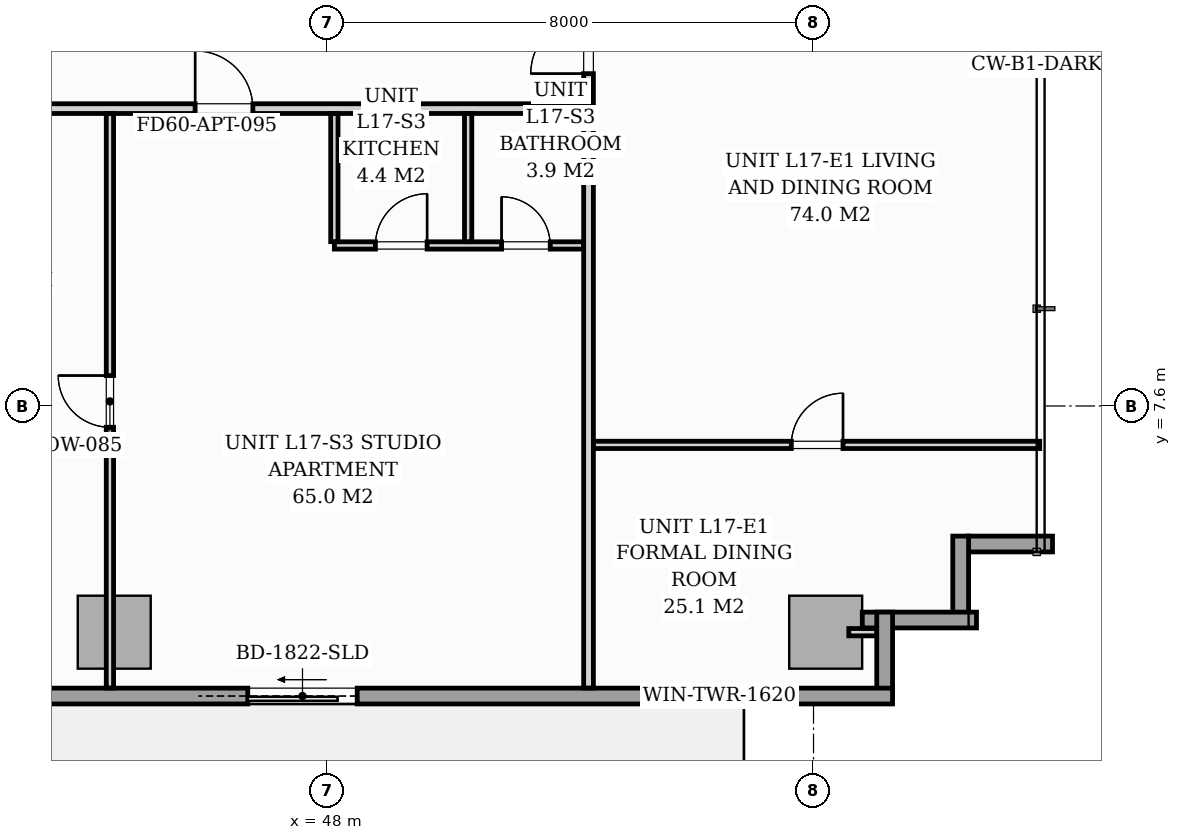
"""IFC4 building model, lengths in metres.
Left out: names, types, materials, properties, quantities, classifications, styles, units other than length and angle.
Written with IfcOpenShell. Run it as: python <this file> out.ifc"""

import sys

from ifc_helpers import new_model, si_unit, direction, frame, frame_2d, origin, origin_2d, place, context, subcontext, project, spatial, rectangle, extrude, source, transform, mapped, element, fill, save


model = new_model("IFC4")
c1 = context("Model", 3, precision=1e-05, world=origin(), true_north=direction((0.0, 1.0)))
c2 = subcontext(c1, "Body", "Model", "MODEL_VIEW")
j1 = project(units=[si_unit("LENGTHUNIT", "METRE"), si_unit("PLANEANGLEUNIT", "RADIAN")], contexts=[c1])
p1 = place(None, origin())
s1 = spatial("IfcSite", under=j1, at=p1, CompositionType="ELEMENT")
p2 = place(p1, origin())
s2 = spatial("IfcBuilding", under=s1, at=p2, CompositionType="ELEMENT")
p3 = place(p2, frame((0.0, 0.0, 61.4)))
s3 = spatial("IfcBuildingStorey", under=s2, at=p3, CompositionType="ELEMENT", Elevation=61.4)
m1 = source(origin(), c2, "Body", "SweptSolid", [
    extrude(rectangle(XDim=1.2, YDim=1.2, at=origin_2d()), origin(), (0.0, 0.0, 1.0), 3.196),
])
for number, where, z_axis, x_axis in (
    (1, (44.5, 3.88, 0.002), (0.0, 0.0, 1.0), (1.0, 0.0, 0.0)),
    (2, (56.2, 3.88, 0.002), (0.0, 0.0, 1.0), (1.0, 0.0, 0.0)),
):
    element("IfcColumn", number, at=place(p3, frame(where, z_axis=z_axis, x_axis=x_axis)), inside=s3, PredefinedType="COLUMN", context=c2, shape_type="MappedRepresentation", body=[
        mapped(m1, transform((0.0, 0.0, 0.0), scale=1.0)),
    ])
for number, where, z_axis, x_axis in (
    (3, (59.93, 5.33, 0.0), (0.0, 0.0, 1.0), (-1.0, 0.0, 0.0)),
    (4, (58.42, 5.46, 0.0), (0.0, 0.0, 1.0), (0.0, -1.0, 0.0)),
):
    element("IfcWall", number, at=place(p3, frame(where, z_axis=z_axis, x_axis=x_axis)), inside=s3, PredefinedType="STANDARD", context=c2, shape_type="SweptSolid", body=[
        extrude(rectangle(XDim=1.395, YDim=0.26, at=frame_2d((0.698, 0.0))), origin(), (0.0, 0.0, 1.0), 2.94),
    ])
p4 = place(p3, frame((58.68, 4.08, 0.0), z_axis=(0.0, 0.0, 1.0), x_axis=(-1.0, 0.0, 0.0)))
e5 = element("IfcWall", 5, at=p4, inside=s3, PredefinedType="STANDARD", context=c2, shape_type="SweptSolid", body=[
    extrude(rectangle(XDim=1.878, YDim=0.26, at=frame_2d((0.939, 0.0))), origin(), (0.0, 0.0, 1.0), 2.94),
])
p5 = place(p3, frame((57.17, 4.21, 0.0), z_axis=(0.0, 0.0, 1.0), x_axis=(0.0, -1.0, 0.0)))
e6 = element("IfcWall", 6, at=p5, inside=s3, PredefinedType="STANDARD", context=c2, shape_type="SweptSolid", body=[
    extrude(rectangle(XDim=1.395, YDim=0.26, at=frame_2d((0.698, 0.0))), origin(), (0.0, 0.0, 1.0), 2.94),
])
p6 = place(p3, frame((57.3, 2.83, 0.0), z_axis=(0.0, 0.0, 1.0), x_axis=(-1.0, 0.0, 0.0)))
e7 = element("IfcWall", 7, at=p6, inside=s3, PredefinedType="STANDARD", context=c2, shape_type="SweptSolid", body=[
    extrude(rectangle(XDim=17.15, YDim=0.26, at=frame_2d((8.575, 0.0))), origin(), (0.0, 0.0, 1.0), 2.94),
])
p7 = place(p6, frame((8.804, 0.0, 0.0)))
e8 = element("IfcOpeningElement", 8, at=p7, cuts=e7, PredefinedType="OPENING", context=c2, shape_type="SweptSolid", body=[
    extrude(rectangle(XDim=1.8, YDim=2.06, at=frame_2d((0.9, 1.03))), frame((0.0, 0.14, 0.0), z_axis=(0.0, -1.0, 0.0), x_axis=(1.0, 0.0, 0.0)), (0.0, 0.0, 1.0), 0.28),
])
p8 = place(p6, frame((2.05, 0.0, 0.65)))
e9 = element("IfcOpeningElement", 9, at=p8, cuts=e7, PredefinedType="OPENING", context=c2, shape_type="SweptSolid", body=[
    extrude(rectangle(XDim=1.6, YDim=1.5, at=frame_2d((0.8, 0.75))), frame((0.0, 0.14, 0.0), z_axis=(0.0, -1.0, 0.0), x_axis=(1.0, 0.0, 0.0)), (0.0, 0.0, 1.0), 0.28),
])
p9 = place(p3, frame((15.2, 12.49, 0.0), z_axis=(0.0, 0.0, 1.0), x_axis=(1.0, 0.0, 0.0)))
e10 = element("IfcWall", 10, at=p9, inside=s3, PredefinedType="PARTITIONING", context=c2, shape_type="SweptSolid", body=[
    extrude(rectangle(XDim=37.1, YDim=0.16, at=frame_2d((18.55, 0.0))), origin(), (0.0, 0.0, 1.0), 2.94),
])
p10 = place(p9, frame((5.863, 0.0, 0.0)))
e11 = element("IfcOpeningElement", 11, at=p10, cuts=e10, PredefinedType="OPENING", context=c2, shape_type="SweptSolid", body=[
    extrude(rectangle(XDim=0.95, YDim=2.06, at=frame_2d((0.475, 1.03))), frame((0.0, 0.09, 0.0), z_axis=(0.0, -1.0, 0.0), x_axis=(1.0, 0.0, 0.0)), (0.0, 0.0, 1.0), 0.18),
])
p11 = place(p9, frame((18.25, 0.0, 0.0)))
e12 = element("IfcOpeningElement", 12, at=p11, cuts=e10, PredefinedType="OPENING", context=c2, shape_type="SweptSolid", body=[
    extrude(rectangle(XDim=0.95, YDim=2.06, at=frame_2d((0.475, 1.03))), frame((0.0, 0.09, 0.0), z_axis=(0.0, -1.0, 0.0), x_axis=(1.0, 0.0, 0.0)), (0.0, 0.0, 1.0), 0.18),
])
p12 = place(p9, frame((30.63, 0.0, 0.0)))
e13 = element("IfcOpeningElement", 13, at=p12, cuts=e10, PredefinedType="OPENING", context=c2, shape_type="SweptSolid", body=[
    extrude(rectangle(XDim=0.95, YDim=2.06, at=frame_2d((0.475, 1.03))), frame((0.0, 0.09, 0.0), z_axis=(0.0, -1.0, 0.0), x_axis=(1.0, 0.0, 0.0)), (0.0, 0.0, 1.0), 0.18),
])
p13 = place(p3, frame((52.3, 2.962, 0.0), z_axis=(0.0, 0.0, 1.0), x_axis=(0.0, 1.0, 0.0)))
e14 = element("IfcWall", 14, at=p13, inside=s3, PredefinedType="PARTITIONING", context=c2, shape_type="SweptSolid", body=[
    extrude(rectangle(XDim=9.446, YDim=0.16, at=frame_2d((4.723, 0.0))), origin(), (0.0, 0.0, 1.0), 2.94),
])
p14 = place(p3, frame((52.3, 12.572, 0.0), z_axis=(0.0, 0.0, 1.0), x_axis=(0.0, 1.0, 0.0)))
e15 = element("IfcWall", 15, at=p14, inside=s3, PredefinedType="PARTITIONING", context=c2, shape_type="SweptSolid", body=[
    extrude(rectangle(XDim=14.866, YDim=0.16, at=frame_2d((7.433, 0.0))), origin(), (0.0, 0.0, 1.0), 2.94),
])
p15 = place(p14, frame((0.493, 0.0, 0.0)))
e16 = element("IfcOpeningElement", 16, at=p15, cuts=e15, PredefinedType="OPENING", context=c2, shape_type="SweptSolid", body=[
    extrude(rectangle(XDim=0.95, YDim=2.06, at=frame_2d((0.475, 1.03))), frame((0.0, 0.09, 0.0), z_axis=(0.0, -1.0, 0.0), x_axis=(1.0, 0.0, 0.0)), (0.0, 0.0, 1.0), 0.18),
])
p16 = place(p14, frame((6.471, 0.0, 0.0)))
e17 = element("IfcOpeningElement", 17, at=p16, cuts=e15, PredefinedType="OPENING", context=c2, shape_type="SweptSolid", body=[
    extrude(rectangle(XDim=0.95, YDim=2.06, at=frame_2d((0.475, 1.03))), frame((0.0, 0.09, 0.0), z_axis=(0.0, -1.0, 0.0), x_axis=(1.0, 0.0, 0.0)), (0.0, 0.0, 1.0), 0.18),
])
p17 = place(p3, frame((48.12, 10.24, 0.0), z_axis=(0.0, 0.0, 1.0), x_axis=(1.0, 0.0, 0.0)))
e18 = element("IfcWall", 18, at=p17, inside=s3, PredefinedType="PARTITIONING", context=c2, shape_type="SweptSolid", body=[
    extrude(rectangle(XDim=4.098, YDim=0.12, at=frame_2d((2.049, 0.0))), origin(), (0.0, 0.0, 1.0), 2.94),
])
p18 = place(p17, frame((0.675, 0.0, 0.0)))
e19 = element("IfcOpeningElement", 19, at=p18, cuts=e18, PredefinedType="OPENING", context=c2, shape_type="SweptSolid", body=[
    extrude(rectangle(XDim=0.85, YDim=2.05, at=frame_2d((0.425, 1.025))), frame((0.0, 0.07, 0.0), z_axis=(0.0, -1.0, 0.0), x_axis=(1.0, 0.0, 0.0)), (0.0, 0.0, 1.0), 0.14),
])
p19 = place(p17, frame((2.75, 0.0, 0.0)))
e20 = element("IfcOpeningElement", 20, at=p19, cuts=e18, PredefinedType="OPENING", context=c2, shape_type="SweptSolid", body=[
    extrude(rectangle(XDim=0.8, YDim=2.02, at=frame_2d((0.4, 1.01))), frame((0.0, 0.07, 0.0), z_axis=(0.0, -1.0, 0.0), x_axis=(1.0, 0.0, 0.0)), (0.0, 0.0, 1.0), 0.14),
])
for number, where, z_axis, x_axis in (
    (21, (48.12, 10.302, 0.0), (0.0, 0.0, 1.0), (0.0, 1.0, 0.0)),
    (22, (50.32, 10.302, 0.0), (0.0, 0.0, 1.0), (0.0, 1.0, 0.0)),
):
    element("IfcWall", number, at=place(p3, frame(where, z_axis=z_axis, x_axis=x_axis)), inside=s3, PredefinedType="PARTITIONING", context=c2, shape_type="SweptSolid", body=[
        extrude(rectangle(XDim=2.106, YDim=0.12, at=frame_2d((1.053, 0.0))), origin(), (0.0, 0.0, 1.0), 2.94),
    ])
p20 = place(p3, frame((44.429, 2.962, 0.0), z_axis=(0.0, 0.0, 1.0), x_axis=(0.0, 1.0, 0.0)))
e23 = element("IfcWall", 23, at=p20, inside=s3, PredefinedType="PARTITIONING", context=c2, shape_type="SweptSolid", body=[
    extrude(rectangle(XDim=9.446, YDim=0.12, at=frame_2d((4.723, 0.0))), origin(), (0.0, 0.0, 1.0), 2.136),
])
p21 = place(p20, frame((4.288, 0.0, 0.0)))
e24 = element("IfcOpeningElement", 24, at=p21, cuts=e23, PredefinedType="OPENING", context=c2, shape_type="SweptSolid", body=[
    extrude(rectangle(XDim=0.85, YDim=2.01, at=frame_2d((0.425, 1.005))), frame((0.0, 0.07, 0.0), z_axis=(0.0, -1.0, 0.0), x_axis=(1.0, 0.0, 0.0)), (0.0, 0.0, 1.0), 0.14),
])
p22 = place(p3, frame((52.382, 6.96, 0.0), z_axis=(0.0, 0.0, 1.0), x_axis=(1.0, 0.0, 0.0)))
e25 = element("IfcWall", 25, at=p22, inside=s3, PredefinedType="PARTITIONING", context=c2, shape_type="SweptSolid", body=[
    extrude(rectangle(XDim=7.338, YDim=0.12, at=frame_2d((3.669, 0.0))), origin(), (0.0, 0.0, 1.0), 2.94),
])
p23 = place(p22, frame((3.253, 0.0, 0.0)))
e26 = element("IfcOpeningElement", 26, at=p23, cuts=e25, PredefinedType="OPENING", context=c2, shape_type="SweptSolid", body=[
    extrude(rectangle(XDim=0.85, YDim=2.05, at=frame_2d((0.425, 1.025))), frame((0.0, 0.07, 0.0), z_axis=(0.0, -1.0, 0.0), x_axis=(1.0, 0.0, 0.0)), (0.0, 0.0, 1.0), 0.14),
])
p24 = place(p3, frame((56.58, 3.88, 0.0), z_axis=(0.0, 0.0, 1.0), x_axis=(1.0, 0.0, 0.0)))
e27 = element("IfcWall", 27, at=p24, inside=s3, PredefinedType="PARTITIONING", context=c2, shape_type="SweptSolid", body=[
    extrude(rectangle(XDim=0.458, YDim=0.12, at=frame_2d((0.229, 0.0))), origin(), (0.0, 0.0, 1.0), 2.94),
])
m2 = source(origin(), c2, "Body", "SweptSolid", [
    extrude(rectangle(XDim=1.8, YDim=2.06, at=frame_2d((0.9, 1.03))), frame((0.0, 0.025, 0.0), z_axis=(0.0, -1.0, 0.0), x_axis=(1.0, 0.0, 0.0)), (0.0, 0.0, 1.0), 0.05),
])
p25 = place(p7, origin())
e28 = element("IfcDoor", 28, at=p25, inside=s3, OperationType="SLIDING_TO_RIGHT", PredefinedType="DOOR", context=c2, shape_type="MappedRepresentation", body=[
    mapped(m2, transform((0.0, 0.0, 0.0), scale=1.0)),
])
fill(e8, e28)
m3 = source(origin(), c2, "Body", "SweptSolid", [
    extrude(rectangle(XDim=1.6, YDim=1.5, at=frame_2d((0.8, 0.75))), frame((0.0, 0.03, 0.0), z_axis=(0.0, -1.0, 0.0), x_axis=(1.0, 0.0, 0.0)), (0.0, 0.0, 1.0), 0.06),
])
p26 = place(p8, origin())
e29 = element("IfcWindow", 29, at=p26, inside=s3, PartitioningType="SINGLE_PANEL", PredefinedType="WINDOW", context=c2, shape_type="MappedRepresentation", body=[
    mapped(m3, transform((0.0, 0.0, 0.0), scale=1.0)),
])
fill(e9, e29)
m4 = source(origin(), c2, "Body", "SweptSolid", [
    extrude(rectangle(XDim=0.85, YDim=2.01, at=frame_2d((0.425, 1.005))), frame((0.0, 0.025, 0.0), z_axis=(0.0, -1.0, 0.0), x_axis=(1.0, 0.0, 0.0)), (0.0, 0.0, 1.0), 0.05),
])
p27 = place(p21, origin())
e30 = element("IfcDoor", 30, at=p27, inside=s3, OperationType="SINGLE_SWING_RIGHT", PredefinedType="DOOR", context=c2, shape_type="MappedRepresentation", body=[
    mapped(m4, transform((0.0, 0.0, 0.0), scale=1.0)),
])
fill(e24, e30)
m5 = source(origin(), c2, "Body", "SweptSolid", [
    extrude(rectangle(XDim=0.95, YDim=2.06, at=frame_2d((0.475, 1.03))), frame((0.0, 0.025, 0.0), z_axis=(0.0, -1.0, 0.0), x_axis=(1.0, 0.0, 0.0)), (0.0, 0.0, 1.0), 0.05),
])
p28 = place(p12, origin())
e31 = element("IfcDoor", 31, at=p28, inside=s3, OperationType="SINGLE_SWING_LEFT", PredefinedType="DOOR", context=c2, shape_type="MappedRepresentation", body=[
    mapped(m5, transform((0.0, 0.0, 0.0), scale=1.0)),
])
fill(e13, e31)
m6 = source(origin(), c2, "Body", "SweptSolid", [
    extrude(rectangle(XDim=0.85, YDim=2.05, at=frame_2d((0.425, 1.025))), frame((0.0, 0.025, 0.0), z_axis=(0.0, -1.0, 0.0), x_axis=(1.0, 0.0, 0.0)), (0.0, 0.0, 1.0), 0.05),
])
p29 = place(p18, origin())
e32 = element("IfcDoor", 32, at=p29, inside=s3, OperationType="SINGLE_SWING_RIGHT", PredefinedType="DOOR", context=c2, shape_type="MappedRepresentation", body=[
    mapped(m6, transform((0.0, 0.0, 0.0), scale=1.0)),
])
fill(e19, e32)
m7 = source(origin(), c2, "Body", "SweptSolid", [
    extrude(rectangle(XDim=0.8, YDim=2.02, at=frame_2d((0.4, 1.01))), frame((0.0, 0.025, 0.0), z_axis=(0.0, -1.0, 0.0), x_axis=(1.0, 0.0, 0.0)), (0.0, 0.0, 1.0), 0.05),
])
p30 = place(p19, origin())
e33 = element("IfcDoor", 33, at=p30, inside=s3, OperationType="SINGLE_SWING_LEFT", PredefinedType="DOOR", context=c2, shape_type="MappedRepresentation", body=[
    mapped(m7, transform((0.0, 0.0, 0.0), scale=1.0)),
])
fill(e20, e33)
p31 = place(p15, origin())
e34 = element("IfcDoor", 34, at=p31, inside=s3, OperationType="SINGLE_SWING_LEFT", PredefinedType="DOOR", context=c2, shape_type="MappedRepresentation", body=[
    mapped(m5, transform((0.0, 0.0, 0.0), scale=1.0)),
])
fill(e16, e34)
p32 = place(p23, origin())
e35 = element("IfcDoor", 35, at=p32, inside=s3, OperationType="SINGLE_SWING_RIGHT", PredefinedType="DOOR", context=c2, shape_type="MappedRepresentation", body=[
    mapped(m6, transform((0.0, 0.0, 0.0), scale=1.0)),
])
fill(e26, e35)
save(model, sys.argv[1])
